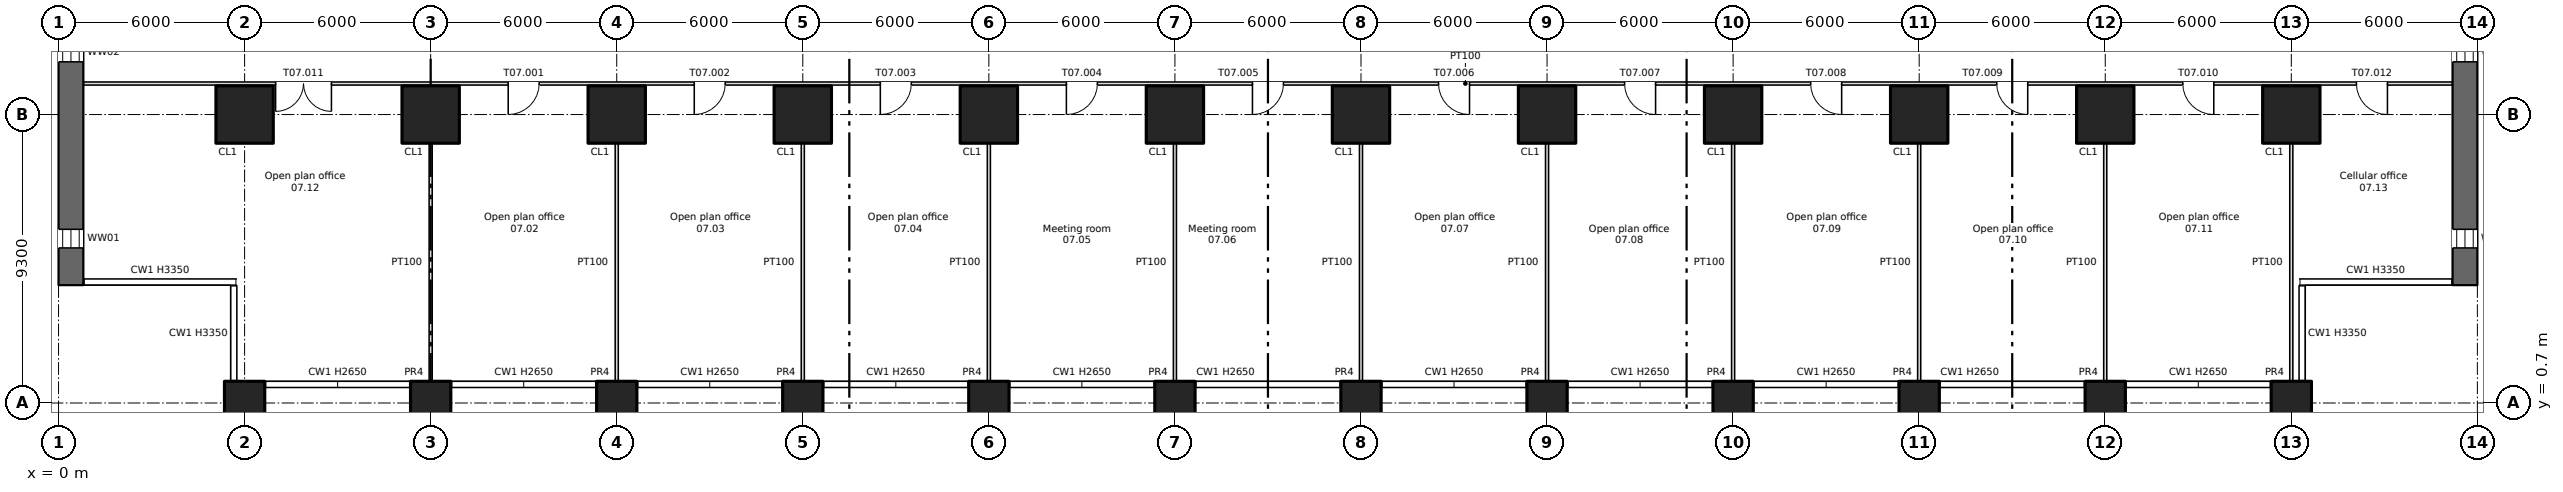
"""IFC4 building model, lengths in metres.
Left out: names, types, materials, properties, quantities, classifications, styles, units other than length and angle.
Written with IfcOpenShell. Run it as: python <this file> out.ifc"""

import sys

from ifc_helpers import new_model, si_unit, direction, frame, frame_2d, origin, origin_2d, place, context, subcontext, project, spatial, rectangle, extrude, element, fill, save


model = new_model("IFC4")
c1 = context("Model", 3, precision=1e-05, world=origin(), true_north=direction((0.0, 1.0)))
c2 = subcontext(c1, "Body", "Model", "MODEL_VIEW")
j1 = project(units=[si_unit("LENGTHUNIT", "METRE"), si_unit("PLANEANGLEUNIT", "RADIAN")], contexts=[c1])
p1 = place(None, origin())
s1 = spatial("IfcSite", under=j1, at=p1, CompositionType="ELEMENT")
p2 = place(p1, origin())
s2 = spatial("IfcBuilding", under=s1, at=p2, CompositionType="ELEMENT")
p3 = place(p2, frame((0.0, 0.0, 22.5)))
s3 = spatial("IfcBuildingStorey", under=s2, at=p3, CompositionType="ELEMENT", Elevation=22.5)
for number, where, z_axis, x_axis in (
    (1, (6.0, 0.7, -0.8), (0.0, 0.0, 1.0), (1.0, 0.0, 0.0)),
    (2, (12.0, 0.7, -0.8), (0.0, 0.0, 1.0), (1.0, 0.0, 0.0)),
    (3, (18.0, 0.7, -0.8), (0.0, 0.0, 1.0), (1.0, 0.0, 0.0)),
    (4, (24.0, 0.7, -0.8), (0.0, 0.0, 1.0), (1.0, 0.0, 0.0)),
    (5, (30.0, 0.7, -0.8), (0.0, 0.0, 1.0), (1.0, 0.0, 0.0)),
    (6, (36.0, 0.7, -0.8), (0.0, 0.0, 1.0), (1.0, 0.0, 0.0)),
    (7, (42.0, 0.7, -0.8), (0.0, 0.0, 1.0), (1.0, 0.0, 0.0)),
    (8, (48.0, 0.7, -0.8), (0.0, 0.0, 1.0), (1.0, 0.0, 0.0)),
    (9, (54.0, 0.7, -0.8), (0.0, 0.0, 1.0), (1.0, 0.0, 0.0)),
    (10, (60.0, 0.7, -0.8), (0.0, 0.0, 1.0), (1.0, 0.0, 0.0)),
    (11, (66.0, 0.7, -0.8), (0.0, 0.0, 1.0), (1.0, 0.0, 0.0)),
    (12, (72.0, 0.7, -0.8), (0.0, 0.0, 1.0), (1.0, 0.0, 0.0)),
):
    element("IfcColumn", number, at=place(p3, frame(where, z_axis=z_axis, x_axis=x_axis)), inside=s3, PredefinedType="COLUMN", context=c2, shape_type="SweptSolid", body=[
        extrude(rectangle(XDim=1.3, YDim=1.4, at=origin_2d()), origin(), (0.0, 0.0, 1.0), 4.15),
    ])
for number, where, z_axis, x_axis in (
    (13, (6.0, 10.0, 0.0), (0.0, 0.0, 1.0), (1.0, 0.0, 0.0)),
    (14, (12.0, 10.0, 0.0), (0.0, 0.0, 1.0), (1.0, 0.0, 0.0)),
    (15, (18.0, 10.0, 0.0), (0.0, 0.0, 1.0), (1.0, 0.0, 0.0)),
    (16, (24.0, 10.0, 0.0), (0.0, 0.0, 1.0), (1.0, 0.0, 0.0)),
    (17, (30.0, 10.0, 0.0), (0.0, 0.0, 1.0), (1.0, 0.0, 0.0)),
    (18, (36.0, 10.0, 0.0), (0.0, 0.0, 1.0), (1.0, 0.0, 0.0)),
    (19, (42.0, 10.0, 0.0), (0.0, 0.0, 1.0), (1.0, 0.0, 0.0)),
    (20, (48.0, 10.0, 0.0), (0.0, 0.0, 1.0), (1.0, 0.0, 0.0)),
    (21, (54.0, 10.0, 0.0), (0.0, 0.0, 1.0), (1.0, 0.0, 0.0)),
    (22, (60.0, 10.0, 0.0), (0.0, 0.0, 1.0), (1.0, 0.0, 0.0)),
    (23, (66.0, 10.0, 0.0), (0.0, 0.0, 1.0), (1.0, 0.0, 0.0)),
    (24, (72.0, 10.0, 0.0), (0.0, 0.0, 1.0), (1.0, 0.0, 0.0)),
):
    element("IfcColumn", number, at=place(p3, frame(where, z_axis=z_axis, x_axis=x_axis)), inside=s3, PredefinedType="COLUMN", context=c2, shape_type="SweptSolid", body=[
        extrude(rectangle(XDim=1.85, YDim=1.85, at=origin_2d()), origin(), (0.0, 0.0, 1.0), 3.35),
    ])
p4 = place(p3, frame((0.4, 4.5, 0.0), z_axis=(0.0, 0.0, 1.0), x_axis=(0.0, 1.0, 0.0)))
e25 = element("IfcWall", 25, at=p4, inside=s3, PredefinedType="SHEAR", context=c2, shape_type="SweptSolid", body=[
    extrude(rectangle(XDim=37.0, YDim=0.8, at=frame_2d((18.5, 0.0))), origin(), (0.0, 0.0, 1.0), 3.35),
])
p5 = place(p4, frame((1.2, 0.0, 0.6)))
e26 = element("IfcOpeningElement", 26, at=p5, cuts=e25, PredefinedType="OPENING", context=c2, shape_type="SweptSolid", body=[
    extrude(rectangle(XDim=0.6, YDim=2.4, at=frame_2d((0.3, 1.2))), frame((0.0, 0.41, 0.0), z_axis=(0.0, -1.0, 0.0), x_axis=(1.0, 0.0, 0.0)), (0.0, 0.0, 1.0), 0.82),
])
p6 = place(p4, frame((7.2, 0.0, 0.6)))
e27 = element("IfcOpeningElement", 27, at=p6, cuts=e25, PredefinedType="OPENING", context=c2, shape_type="SweptSolid", body=[
    extrude(rectangle(XDim=0.6, YDim=2.4, at=frame_2d((0.3, 1.2))), frame((0.0, 0.41, 0.0), z_axis=(0.0, -1.0, 0.0), x_axis=(1.0, 0.0, 0.0)), (0.0, 0.0, 1.0), 0.82),
])
p7 = place(p4, frame((13.2, 0.0, 0.6)))
e28 = element("IfcOpeningElement", 28, at=p7, cuts=e25, PredefinedType="OPENING", context=c2, shape_type="SweptSolid", body=[
    extrude(rectangle(XDim=0.6, YDim=2.4, at=frame_2d((0.3, 1.2))), frame((0.0, 0.41, 0.0), z_axis=(0.0, -1.0, 0.0), x_axis=(1.0, 0.0, 0.0)), (0.0, 0.0, 1.0), 0.82),
])
p8 = place(p4, frame((19.2, 0.0, 0.6)))
e29 = element("IfcOpeningElement", 29, at=p8, cuts=e25, PredefinedType="OPENING", context=c2, shape_type="SweptSolid", body=[
    extrude(rectangle(XDim=0.6, YDim=2.4, at=frame_2d((0.3, 1.2))), frame((0.0, 0.41, 0.0), z_axis=(0.0, -1.0, 0.0), x_axis=(1.0, 0.0, 0.0)), (0.0, 0.0, 1.0), 0.82),
])
p9 = place(p4, frame((25.2, 0.0, 0.6)))
e30 = element("IfcOpeningElement", 30, at=p9, cuts=e25, PredefinedType="OPENING", context=c2, shape_type="SweptSolid", body=[
    extrude(rectangle(XDim=0.6, YDim=2.4, at=frame_2d((0.3, 1.2))), frame((0.0, 0.41, 0.0), z_axis=(0.0, -1.0, 0.0), x_axis=(1.0, 0.0, 0.0)), (0.0, 0.0, 1.0), 0.82),
])
p10 = place(p4, frame((31.2, 0.0, 0.6)))
e31 = element("IfcOpeningElement", 31, at=p10, cuts=e25, PredefinedType="OPENING", context=c2, shape_type="SweptSolid", body=[
    extrude(rectangle(XDim=0.6, YDim=2.4, at=frame_2d((0.3, 1.2))), frame((0.0, 0.41, 0.0), z_axis=(0.0, -1.0, 0.0), x_axis=(1.0, 0.0, 0.0)), (0.0, 0.0, 1.0), 0.82),
])
p11 = place(p3, frame((77.6, 4.5, 0.0), z_axis=(0.0, 0.0, 1.0), x_axis=(0.0, 1.0, 0.0)))
e32 = element("IfcWall", 32, at=p11, inside=s3, PredefinedType="SHEAR", context=c2, shape_type="SweptSolid", body=[
    extrude(rectangle(XDim=37.0, YDim=0.8, at=frame_2d((18.5, 0.0))), origin(), (0.0, 0.0, 1.0), 3.35),
])
p12 = place(p11, frame((1.2, 0.0, 0.6)))
e33 = element("IfcOpeningElement", 33, at=p12, cuts=e32, PredefinedType="OPENING", context=c2, shape_type="SweptSolid", body=[
    extrude(rectangle(XDim=0.6, YDim=2.4, at=frame_2d((0.3, 1.2))), frame((0.0, 0.41, 0.0), z_axis=(0.0, -1.0, 0.0), x_axis=(1.0, 0.0, 0.0)), (0.0, 0.0, 1.0), 0.82),
])
p13 = place(p11, frame((7.2, 0.0, 0.6)))
e34 = element("IfcOpeningElement", 34, at=p13, cuts=e32, PredefinedType="OPENING", context=c2, shape_type="SweptSolid", body=[
    extrude(rectangle(XDim=0.6, YDim=2.4, at=frame_2d((0.3, 1.2))), frame((0.0, 0.41, 0.0), z_axis=(0.0, -1.0, 0.0), x_axis=(1.0, 0.0, 0.0)), (0.0, 0.0, 1.0), 0.82),
])
p14 = place(p11, frame((13.2, 0.0, 0.6)))
e35 = element("IfcOpeningElement", 35, at=p14, cuts=e32, PredefinedType="OPENING", context=c2, shape_type="SweptSolid", body=[
    extrude(rectangle(XDim=0.6, YDim=2.4, at=frame_2d((0.3, 1.2))), frame((0.0, 0.41, 0.0), z_axis=(0.0, -1.0, 0.0), x_axis=(1.0, 0.0, 0.0)), (0.0, 0.0, 1.0), 0.82),
])
p15 = place(p11, frame((19.2, 0.0, 0.6)))
e36 = element("IfcOpeningElement", 36, at=p15, cuts=e32, PredefinedType="OPENING", context=c2, shape_type="SweptSolid", body=[
    extrude(rectangle(XDim=0.6, YDim=2.4, at=frame_2d((0.3, 1.2))), frame((0.0, 0.41, 0.0), z_axis=(0.0, -1.0, 0.0), x_axis=(1.0, 0.0, 0.0)), (0.0, 0.0, 1.0), 0.82),
])
p16 = place(p11, frame((25.2, 0.0, 0.6)))
e37 = element("IfcOpeningElement", 37, at=p16, cuts=e32, PredefinedType="OPENING", context=c2, shape_type="SweptSolid", body=[
    extrude(rectangle(XDim=0.6, YDim=2.4, at=frame_2d((0.3, 1.2))), frame((0.0, 0.41, 0.0), z_axis=(0.0, -1.0, 0.0), x_axis=(1.0, 0.0, 0.0)), (0.0, 0.0, 1.0), 0.82),
])
p17 = place(p11, frame((31.2, 0.0, 0.6)))
e38 = element("IfcOpeningElement", 38, at=p17, cuts=e32, PredefinedType="OPENING", context=c2, shape_type="SweptSolid", body=[
    extrude(rectangle(XDim=0.6, YDim=2.4, at=frame_2d((0.3, 1.2))), frame((0.0, 0.41, 0.0), z_axis=(0.0, -1.0, 0.0), x_axis=(1.0, 0.0, 0.0)), (0.0, 0.0, 1.0), 0.82),
])
p18 = place(p3, frame((0.8, 11.0, 0.0), z_axis=(0.0, 0.0, 1.0), x_axis=(1.0, 0.0, 0.0)))
e39 = element("IfcWall", 39, at=p18, inside=s3, PredefinedType="PARTITIONING", context=c2, shape_type="SweptSolid", body=[
    extrude(rectangle(XDim=76.4, YDim=0.1, at=frame_2d((38.2, 0.0))), origin(), (0.0, 0.0, 1.0), 3.35),
])
p19 = place(p18, frame((13.7, 0.0, 0.0)))
e40 = element("IfcOpeningElement", 40, at=p19, cuts=e39, PredefinedType="OPENING", context=c2, shape_type="SweptSolid", body=[
    extrude(rectangle(XDim=1.0, YDim=2.1, at=frame_2d((0.5, 1.05))), frame((0.0, 0.06, 0.0), z_axis=(0.0, -1.0, 0.0), x_axis=(1.0, 0.0, 0.0)), (0.0, 0.0, 1.0), 0.12),
])
p20 = place(p18, frame((19.7, 0.0, 0.0)))
e41 = element("IfcOpeningElement", 41, at=p20, cuts=e39, PredefinedType="OPENING", context=c2, shape_type="SweptSolid", body=[
    extrude(rectangle(XDim=1.0, YDim=2.1, at=frame_2d((0.5, 1.05))), frame((0.0, 0.06, 0.0), z_axis=(0.0, -1.0, 0.0), x_axis=(1.0, 0.0, 0.0)), (0.0, 0.0, 1.0), 0.12),
])
p21 = place(p18, frame((25.7, 0.0, 0.0)))
e42 = element("IfcOpeningElement", 42, at=p21, cuts=e39, PredefinedType="OPENING", context=c2, shape_type="SweptSolid", body=[
    extrude(rectangle(XDim=1.0, YDim=2.1, at=frame_2d((0.5, 1.05))), frame((0.0, 0.06, 0.0), z_axis=(0.0, -1.0, 0.0), x_axis=(1.0, 0.0, 0.0)), (0.0, 0.0, 1.0), 0.12),
])
p22 = place(p18, frame((31.7, 0.0, 0.0)))
e43 = element("IfcOpeningElement", 43, at=p22, cuts=e39, PredefinedType="OPENING", context=c2, shape_type="SweptSolid", body=[
    extrude(rectangle(XDim=1.0, YDim=2.1, at=frame_2d((0.5, 1.05))), frame((0.0, 0.06, 0.0), z_axis=(0.0, -1.0, 0.0), x_axis=(1.0, 0.0, 0.0)), (0.0, 0.0, 1.0), 0.12),
])
p23 = place(p18, frame((37.7, 0.0, 0.0)))
e44 = element("IfcOpeningElement", 44, at=p23, cuts=e39, PredefinedType="OPENING", context=c2, shape_type="SweptSolid", body=[
    extrude(rectangle(XDim=1.0, YDim=2.1, at=frame_2d((0.5, 1.05))), frame((0.0, 0.06, 0.0), z_axis=(0.0, -1.0, 0.0), x_axis=(1.0, 0.0, 0.0)), (0.0, 0.0, 1.0), 0.12),
])
p24 = place(p18, frame((43.7, 0.0, 0.0)))
e45 = element("IfcOpeningElement", 45, at=p24, cuts=e39, PredefinedType="OPENING", context=c2, shape_type="SweptSolid", body=[
    extrude(rectangle(XDim=1.0, YDim=2.1, at=frame_2d((0.5, 1.05))), frame((0.0, 0.06, 0.0), z_axis=(0.0, -1.0, 0.0), x_axis=(1.0, 0.0, 0.0)), (0.0, 0.0, 1.0), 0.12),
])
p25 = place(p18, frame((49.7, 0.0, 0.0)))
e46 = element("IfcOpeningElement", 46, at=p25, cuts=e39, PredefinedType="OPENING", context=c2, shape_type="SweptSolid", body=[
    extrude(rectangle(XDim=1.0, YDim=2.1, at=frame_2d((0.5, 1.05))), frame((0.0, 0.06, 0.0), z_axis=(0.0, -1.0, 0.0), x_axis=(1.0, 0.0, 0.0)), (0.0, 0.0, 1.0), 0.12),
])
p26 = place(p18, frame((55.7, 0.0, 0.0)))
e47 = element("IfcOpeningElement", 47, at=p26, cuts=e39, PredefinedType="OPENING", context=c2, shape_type="SweptSolid", body=[
    extrude(rectangle(XDim=1.0, YDim=2.1, at=frame_2d((0.5, 1.05))), frame((0.0, 0.06, 0.0), z_axis=(0.0, -1.0, 0.0), x_axis=(1.0, 0.0, 0.0)), (0.0, 0.0, 1.0), 0.12),
])
p27 = place(p18, frame((61.7, 0.0, 0.0)))
e48 = element("IfcOpeningElement", 48, at=p27, cuts=e39, PredefinedType="OPENING", context=c2, shape_type="SweptSolid", body=[
    extrude(rectangle(XDim=1.0, YDim=2.1, at=frame_2d((0.5, 1.05))), frame((0.0, 0.06, 0.0), z_axis=(0.0, -1.0, 0.0), x_axis=(1.0, 0.0, 0.0)), (0.0, 0.0, 1.0), 0.12),
])
p28 = place(p18, frame((67.7, 0.0, 0.0)))
e49 = element("IfcOpeningElement", 49, at=p28, cuts=e39, PredefinedType="OPENING", context=c2, shape_type="SweptSolid", body=[
    extrude(rectangle(XDim=1.0, YDim=2.1, at=frame_2d((0.5, 1.05))), frame((0.0, 0.06, 0.0), z_axis=(0.0, -1.0, 0.0), x_axis=(1.0, 0.0, 0.0)), (0.0, 0.0, 1.0), 0.12),
])
p29 = place(p18, frame((6.2, 0.0, 0.0)))
e50 = element("IfcOpeningElement", 50, at=p29, cuts=e39, PredefinedType="OPENING", context=c2, shape_type="SweptSolid", body=[
    extrude(rectangle(XDim=1.8, YDim=2.1, at=frame_2d((0.9, 1.05))), frame((0.0, 0.06, 0.0), z_axis=(0.0, -1.0, 0.0), x_axis=(1.0, 0.0, 0.0)), (0.0, 0.0, 1.0), 0.12),
])
p30 = place(p18, frame((73.3, 0.0, 0.0)))
e51 = element("IfcOpeningElement", 51, at=p30, cuts=e39, PredefinedType="OPENING", context=c2, shape_type="SweptSolid", body=[
    extrude(rectangle(XDim=1.0, YDim=2.1, at=frame_2d((0.5, 1.05))), frame((0.0, 0.06, 0.0), z_axis=(0.0, -1.0, 0.0), x_axis=(1.0, 0.0, 0.0)), (0.0, 0.0, 1.0), 0.12),
])
for number, where, z_axis, x_axis in (
    (52, (12.0, 1.4, 0.0), (0.0, 0.0, 1.0), (0.0, 1.0, 0.0)),
    (53, (18.0, 1.4, 0.0), (0.0, 0.0, 1.0), (0.0, 1.0, 0.0)),
    (54, (24.0, 1.4, 0.0), (0.0, 0.0, 1.0), (0.0, 1.0, 0.0)),
    (55, (30.0, 1.4, 0.0), (0.0, 0.0, 1.0), (0.0, 1.0, 0.0)),
    (56, (36.0, 1.4, 0.0), (0.0, 0.0, 1.0), (0.0, 1.0, 0.0)),
    (57, (42.0, 1.4, 0.0), (0.0, 0.0, 1.0), (0.0, 1.0, 0.0)),
    (58, (48.0, 1.4, 0.0), (0.0, 0.0, 1.0), (0.0, 1.0, 0.0)),
    (59, (54.0, 1.4, 0.0), (0.0, 0.0, 1.0), (0.0, 1.0, 0.0)),
    (60, (60.0, 1.4, 0.0), (0.0, 0.0, 1.0), (0.0, 1.0, 0.0)),
    (61, (66.0, 1.4, 0.0), (0.0, 0.0, 1.0), (0.0, 1.0, 0.0)),
    (62, (72.0, 1.4, 0.0), (0.0, 0.0, 1.0), (0.0, 1.0, 0.0)),
):
    element("IfcWall", number, at=place(p3, frame(where, z_axis=z_axis, x_axis=x_axis)), inside=s3, PredefinedType="PARTITIONING", context=c2, shape_type="SweptSolid", body=[
        extrude(rectangle(XDim=7.675, YDim=0.1, at=frame_2d((3.837, 0.0))), origin(), (0.0, 0.0, 1.0), 3.35),
    ])
p31 = place(p5, origin())
e63 = element("IfcWindow", 63, at=p31, inside=s3, PartitioningType="SINGLE_PANEL", PredefinedType="WINDOW", context=c2, shape_type="SweptSolid", body=[
    extrude(rectangle(XDim=0.6, YDim=2.4, at=frame_2d((0.3, 1.2))), frame((0.0, 0.03, 0.0), z_axis=(0.0, -1.0, 0.0), x_axis=(1.0, 0.0, 0.0)), (0.0, 0.0, 1.0), 0.06),
])
fill(e26, e63)
p32 = place(p6, origin())
e64 = element("IfcWindow", 64, at=p32, inside=s3, PartitioningType="SINGLE_PANEL", PredefinedType="WINDOW", context=c2, shape_type="SweptSolid", body=[
    extrude(rectangle(XDim=0.6, YDim=2.4, at=frame_2d((0.3, 1.2))), frame((0.0, 0.03, 0.0), z_axis=(0.0, -1.0, 0.0), x_axis=(1.0, 0.0, 0.0)), (0.0, 0.0, 1.0), 0.06),
])
fill(e27, e64)
p33 = place(p12, origin())
e65 = element("IfcWindow", 65, at=p33, inside=s3, PartitioningType="SINGLE_PANEL", PredefinedType="WINDOW", context=c2, shape_type="SweptSolid", body=[
    extrude(rectangle(XDim=0.6, YDim=2.4, at=frame_2d((0.3, 1.2))), frame((0.0, 0.03, 0.0), z_axis=(0.0, -1.0, 0.0), x_axis=(1.0, 0.0, 0.0)), (0.0, 0.0, 1.0), 0.06),
])
fill(e33, e65)
p34 = place(p13, origin())
e66 = element("IfcWindow", 66, at=p34, inside=s3, PartitioningType="SINGLE_PANEL", PredefinedType="WINDOW", context=c2, shape_type="SweptSolid", body=[
    extrude(rectangle(XDim=0.6, YDim=2.4, at=frame_2d((0.3, 1.2))), frame((0.0, 0.03, 0.0), z_axis=(0.0, -1.0, 0.0), x_axis=(1.0, 0.0, 0.0)), (0.0, 0.0, 1.0), 0.06),
])
fill(e34, e66)
p35 = place(p19, origin())
e67 = element("IfcDoor", 67, at=p35, inside=s3, OperationType="SINGLE_SWING_LEFT", PredefinedType="DOOR", context=c2, shape_type="SweptSolid", body=[
    extrude(rectangle(XDim=1.0, YDim=2.1, at=frame_2d((0.5, 1.05))), frame((0.0, 0.025, 0.0), z_axis=(0.0, -1.0, 0.0), x_axis=(1.0, 0.0, 0.0)), (0.0, 0.0, 1.0), 0.05),
])
fill(e40, e67)
p36 = place(p20, origin())
e68 = element("IfcDoor", 68, at=p36, inside=s3, OperationType="SINGLE_SWING_LEFT", PredefinedType="DOOR", context=c2, shape_type="SweptSolid", body=[
    extrude(rectangle(XDim=1.0, YDim=2.1, at=frame_2d((0.5, 1.05))), frame((0.0, 0.025, 0.0), z_axis=(0.0, -1.0, 0.0), x_axis=(1.0, 0.0, 0.0)), (0.0, 0.0, 1.0), 0.05),
])
fill(e41, e68)
p37 = place(p21, origin())
e69 = element("IfcDoor", 69, at=p37, inside=s3, OperationType="SINGLE_SWING_LEFT", PredefinedType="DOOR", context=c2, shape_type="SweptSolid", body=[
    extrude(rectangle(XDim=1.0, YDim=2.1, at=frame_2d((0.5, 1.05))), frame((0.0, 0.025, 0.0), z_axis=(0.0, -1.0, 0.0), x_axis=(1.0, 0.0, 0.0)), (0.0, 0.0, 1.0), 0.05),
])
fill(e42, e69)
p38 = place(p22, origin())
e70 = element("IfcDoor", 70, at=p38, inside=s3, OperationType="SINGLE_SWING_LEFT", PredefinedType="DOOR", context=c2, shape_type="SweptSolid", body=[
    extrude(rectangle(XDim=1.0, YDim=2.1, at=frame_2d((0.5, 1.05))), frame((0.0, 0.025, 0.0), z_axis=(0.0, -1.0, 0.0), x_axis=(1.0, 0.0, 0.0)), (0.0, 0.0, 1.0), 0.05),
])
fill(e43, e70)
p39 = place(p23, origin())
e71 = element("IfcDoor", 71, at=p39, inside=s3, OperationType="SINGLE_SWING_LEFT", PredefinedType="DOOR", context=c2, shape_type="SweptSolid", body=[
    extrude(rectangle(XDim=1.0, YDim=2.1, at=frame_2d((0.5, 1.05))), frame((0.0, 0.025, 0.0), z_axis=(0.0, -1.0, 0.0), x_axis=(1.0, 0.0, 0.0)), (0.0, 0.0, 1.0), 0.05),
])
fill(e44, e71)
p40 = place(p24, origin())
e72 = element("IfcDoor", 72, at=p40, inside=s3, OperationType="SINGLE_SWING_RIGHT", PredefinedType="DOOR", context=c2, shape_type="SweptSolid", body=[
    extrude(rectangle(XDim=1.0, YDim=2.1, at=frame_2d((0.5, 1.05))), frame((0.0, 0.025, 0.0), z_axis=(0.0, -1.0, 0.0), x_axis=(1.0, 0.0, 0.0)), (0.0, 0.0, 1.0), 0.05),
])
fill(e45, e72)
p41 = place(p25, origin())
e73 = element("IfcDoor", 73, at=p41, inside=s3, OperationType="SINGLE_SWING_RIGHT", PredefinedType="DOOR", context=c2, shape_type="SweptSolid", body=[
    extrude(rectangle(XDim=1.0, YDim=2.1, at=frame_2d((0.5, 1.05))), frame((0.0, 0.025, 0.0), z_axis=(0.0, -1.0, 0.0), x_axis=(1.0, 0.0, 0.0)), (0.0, 0.0, 1.0), 0.05),
])
fill(e46, e73)
p42 = place(p26, origin())
e74 = element("IfcDoor", 74, at=p42, inside=s3, OperationType="SINGLE_SWING_RIGHT", PredefinedType="DOOR", context=c2, shape_type="SweptSolid", body=[
    extrude(rectangle(XDim=1.0, YDim=2.1, at=frame_2d((0.5, 1.05))), frame((0.0, 0.025, 0.0), z_axis=(0.0, -1.0, 0.0), x_axis=(1.0, 0.0, 0.0)), (0.0, 0.0, 1.0), 0.05),
])
fill(e47, e74)
p43 = place(p27, origin())
e75 = element("IfcDoor", 75, at=p43, inside=s3, OperationType="SINGLE_SWING_RIGHT", PredefinedType="DOOR", context=c2, shape_type="SweptSolid", body=[
    extrude(rectangle(XDim=1.0, YDim=2.1, at=frame_2d((0.5, 1.05))), frame((0.0, 0.025, 0.0), z_axis=(0.0, -1.0, 0.0), x_axis=(1.0, 0.0, 0.0)), (0.0, 0.0, 1.0), 0.05),
])
fill(e48, e75)
p44 = place(p28, origin())
e76 = element("IfcDoor", 76, at=p44, inside=s3, OperationType="SINGLE_SWING_RIGHT", PredefinedType="DOOR", context=c2, shape_type="SweptSolid", body=[
    extrude(rectangle(XDim=1.0, YDim=2.1, at=frame_2d((0.5, 1.05))), frame((0.0, 0.025, 0.0), z_axis=(0.0, -1.0, 0.0), x_axis=(1.0, 0.0, 0.0)), (0.0, 0.0, 1.0), 0.05),
])
fill(e49, e76)
p45 = place(p29, origin())
e77 = element("IfcDoor", 77, at=p45, inside=s3, OperationType="DOUBLE_DOOR_SINGLE_SWING", PredefinedType="DOOR", context=c2, shape_type="SweptSolid", body=[
    extrude(rectangle(XDim=1.8, YDim=2.1, at=frame_2d((0.9, 1.05))), frame((0.0, 0.025, 0.0), z_axis=(0.0, -1.0, 0.0), x_axis=(1.0, 0.0, 0.0)), (0.0, 0.0, 1.0), 0.05),
])
fill(e50, e77)
p46 = place(p30, origin())
e78 = element("IfcDoor", 78, at=p46, inside=s3, OperationType="SINGLE_SWING_RIGHT", PredefinedType="DOOR", context=c2, shape_type="SweptSolid", body=[
    extrude(rectangle(XDim=1.0, YDim=2.1, at=frame_2d((0.5, 1.05))), frame((0.0, 0.025, 0.0), z_axis=(0.0, -1.0, 0.0), x_axis=(1.0, 0.0, 0.0)), (0.0, 0.0, 1.0), 0.05),
])
fill(e51, e78)
save(model, sys.argv[1])
